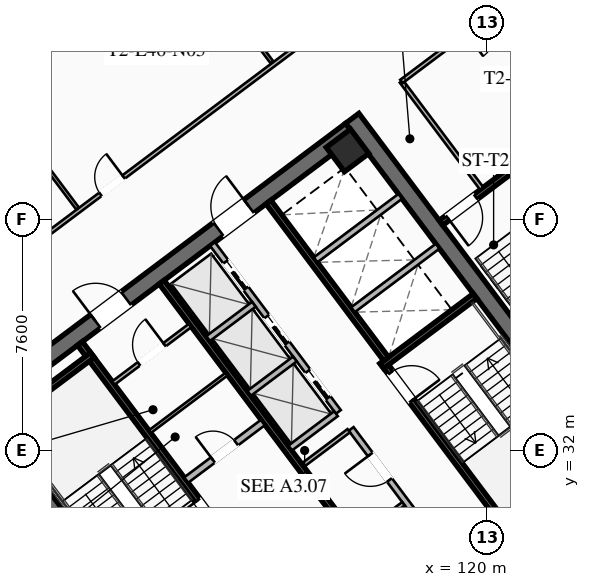
"""IFC4 building model, lengths in metres.
Left out: names, types, materials, properties, quantities, classifications, styles, units other than length and angle.
Written with IfcOpenShell. Run it as: python <this file> out.ifc"""

import sys

from ifc_helpers import new_model, si_unit, direction, frame, frame_2d, origin, origin_2d, place, context, subcontext, project, spatial, rectangle, hollow_rectangle, extrude, element, fill, save


model = new_model("IFC4")
c1 = context("Model", 3, precision=1e-05, world=origin(), true_north=direction((0.0, 1.0)))
c2 = subcontext(c1, "Body", "Model", "MODEL_VIEW")
j1 = project(units=[si_unit("LENGTHUNIT", "METRE"), si_unit("PLANEANGLEUNIT", "RADIAN")], contexts=[c1])
p1 = place(None, origin())
s1 = spatial("IfcSite", under=j1, at=p1, CompositionType="ELEMENT")
p2 = place(p1, origin())
s2 = spatial("IfcBuilding", under=s1, at=p2, CompositionType="ELEMENT")
p3 = place(p2, frame((0.0, 0.0, 171.2)))
s3 = spatial("IfcBuildingStorey", under=s2, at=p3, CompositionType="ELEMENT", Elevation=171.2)
for number, where, z_axis, x_axis in (
    (1, (112.436, 21.077, 0.0), (0.0, 0.0, 1.0), (-0.6, 0.8, 0.0)),
    (2, (115.564, 42.923, 0.0), (0.0, 0.0, 1.0), (0.6, -0.8, 0.0)),
):
    element("IfcWall", number, at=place(p3, frame(where, z_axis=z_axis, x_axis=x_axis)), inside=s3, PredefinedType="SHEAR", context=c2, shape_type="SweptSolid", body=[
        extrude(rectangle(XDim=15.6, YDim=0.55, at=frame_2d((7.8, 0.0))), origin(), (0.0, 0.0, 1.0), 3.55),
    ])
p4 = place(p3, frame((124.539, 30.498, 0.0), z_axis=(0.0, 0.0, 1.0), x_axis=(-0.799998054672, -0.600002593761, 0.0)))
e3 = element("IfcWall", 3, at=p4, inside=s3, PredefinedType="SHEAR", context=c2, shape_type="SweptSolid", body=[
    extrude(rectangle(XDim=15.06, YDim=0.55, at=frame_2d((7.53, 0.0))), origin(), (0.0, 0.0, 1.0), 3.55),
])
p5 = place(p4, frame((9.23, 0.0, 0.0)))
e4 = element("IfcOpeningElement", 4, at=p5, cuts=e3, PredefinedType="OPENING", context=c2, shape_type="SweptSolid", body=[
    extrude(rectangle(XDim=1.25, YDim=2.25, at=frame_2d((0.625, 1.125))), frame((0.0, 0.285, 0.0), z_axis=(0.0, -1.0, 0.0), x_axis=(1.0, 0.0, 0.0)), (0.0, 0.0, 1.0), 0.57),
])
p6 = place(p4, frame((4.18, 0.0, 0.0)))
e5 = element("IfcOpeningElement", 5, at=p6, cuts=e3, PredefinedType="OPENING", context=c2, shape_type="SweptSolid", body=[
    extrude(rectangle(XDim=1.25, YDim=2.25, at=frame_2d((0.625, 1.125))), frame((0.0, 0.285, 0.0), z_axis=(0.0, -1.0, 0.0), x_axis=(1.0, 0.0, 0.0)), (0.0, 0.0, 1.0), 0.57),
])
p7 = place(p3, frame((103.461, 33.502, 0.0), z_axis=(0.0, 0.0, 1.0), x_axis=(0.799998054672, 0.600002593761, 0.0)))
e6 = element("IfcWall", 6, at=p7, inside=s3, PredefinedType="SHEAR", context=c2, shape_type="SweptSolid", body=[
    extrude(rectangle(XDim=15.06, YDim=0.55, at=frame_2d((7.53, 0.0))), origin(), (0.0, 0.0, 1.0), 3.55),
])
p8 = place(p7, frame((4.58, 0.0, 0.0)))
e7 = element("IfcOpeningElement", 7, at=p8, cuts=e6, PredefinedType="OPENING", context=c2, shape_type="SweptSolid", body=[
    extrude(rectangle(XDim=1.25, YDim=2.25, at=frame_2d((0.625, 1.125))), frame((0.0, 0.285, 0.0), z_axis=(0.0, -1.0, 0.0), x_axis=(1.0, 0.0, 0.0)), (0.0, 0.0, 1.0), 0.57),
])
p9 = place(p7, frame((9.63, 0.0, 0.0)))
e8 = element("IfcOpeningElement", 8, at=p9, cuts=e6, PredefinedType="OPENING", context=c2, shape_type="SweptSolid", body=[
    extrude(rectangle(XDim=1.25, YDim=2.25, at=frame_2d((0.625, 1.125))), frame((0.0, 0.285, 0.0), z_axis=(0.0, -1.0, 0.0), x_axis=(1.0, 0.0, 0.0)), (0.0, 0.0, 1.0), 0.57),
])
p10 = place(p3, frame((115.41, 41.87, 0.0), z_axis=(0.0, 0.0, 1.0), x_axis=(0.799999996291, 0.600000004945, 0.0)))
e9 = element("IfcColumn", 9, at=p10, inside=s3, PredefinedType="COLUMN", context=c2, shape_type="SweptSolid", body=[
    extrude(hollow_rectangle(XDim=1.0, YDim=1.0, WallThickness=0.04, at=origin_2d()), origin(), (0.0, 0.0, 1.0), 3.37),
])
p11 = place(p3, frame((111.44, 29.08, 0.0), z_axis=(0.0, 0.0, 1.0), x_axis=(-0.59999029481, 0.8000072788, 0.0)))
e10 = element("IfcWall", 10, at=p11, inside=s3, PredefinedType="SHEAR", context=c2, shape_type="SweptSolid", body=[
    extrude(rectangle(XDim=8.05, YDim=0.2, at=frame_2d((4.025, 0.0))), origin(), (0.0, 0.0, 1.0), 3.37),
])
p12 = place(p11, frame((0.45, 0.0, 0.0)))
e11 = element("IfcOpeningElement", 11, at=p12, cuts=e10, PredefinedType="OPENING", context=c2, shape_type="SweptSolid", body=[
    extrude(rectangle(XDim=1.15, YDim=2.2, at=frame_2d((0.575, 1.1))), frame((0.0, 0.11, 0.0), z_axis=(0.0, -1.0, 0.0), x_axis=(1.0, 0.0, 0.0)), (0.0, 0.0, 1.0), 0.22),
])
p13 = place(p3, frame((103.956, 32.842, 0.0), z_axis=(0.0, 0.0, 1.0), x_axis=(0.800015298837, 0.599979601008, 0.0)))
e12 = element("IfcWall", 12, at=p13, inside=s3, PredefinedType="SHEAR", context=c2, shape_type="SweptSolid", body=[
    extrude(rectangle(XDim=3.83, YDim=0.2, at=frame_2d((1.915, 0.0))), origin(), (0.0, 0.0, 1.0), 3.37),
])
p14 = place(p3, frame((116.56, 34.92, 0.0), z_axis=(0.0, 0.0, 1.0), x_axis=(0.59999029481, -0.8000072788, 0.0)))
e13 = element("IfcWall", 13, at=p14, inside=s3, PredefinedType="SHEAR", context=c2, shape_type="SweptSolid", body=[
    extrude(rectangle(XDim=8.05, YDim=0.2, at=frame_2d((4.025, 0.0))), origin(), (0.0, 0.0, 1.0), 3.37),
])
p15 = place(p14, frame((0.45, 0.0, 0.0)))
e14 = element("IfcOpeningElement", 14, at=p15, cuts=e13, PredefinedType="OPENING", context=c2, shape_type="SweptSolid", body=[
    extrude(rectangle(XDim=1.15, YDim=2.2, at=frame_2d((0.575, 1.1))), frame((0.0, 0.11, 0.0), z_axis=(0.0, -1.0, 0.0), x_axis=(1.0, 0.0, 0.0)), (0.0, 0.0, 1.0), 0.22),
])
p16 = place(p3, frame((116.54, 34.78, 0.0), z_axis=(0.0, 0.0, 1.0), x_axis=(0.800015298837, 0.599979601008, 0.0)))
e15 = element("IfcWall", 15, at=p16, inside=s3, PredefinedType="SHEAR", context=c2, shape_type="SweptSolid", body=[
    extrude(rectangle(XDim=3.83, YDim=0.2, at=frame_2d((1.915, 0.0))), origin(), (0.0, 0.0, 1.0), 3.37),
])
p17 = place(p3, frame((117.998, 25.936, 0.0), z_axis=(0.0, 0.0, 1.0), x_axis=(-0.600002693989, 0.799997979501, 0.0)))
e16 = element("IfcWall", 16, at=p17, inside=s3, PredefinedType="SHEAR", context=c2, shape_type="SweptSolid", body=[
    extrude(rectangle(XDim=14.5, YDim=0.2, at=frame_2d((7.25, 0.0))), origin(), (0.0, 0.0, 1.0), 3.37),
])
p18 = place(p3, frame((110.104, 31.028, 0.0), z_axis=(0.0, 0.0, 1.0), x_axis=(0.800018601094, 0.59997519774, 0.0)))
e17 = element("IfcWall", 17, at=p18, inside=s3, PredefinedType="SOLIDWALL", context=c2, shape_type="SweptSolid", body=[
    extrude(rectangle(XDim=3.15, YDim=0.22, at=frame_2d((1.575, 0.0))), origin(), (0.0, 0.0, 1.0), 2.723),
])
p19 = place(p18, frame((1.1, 0.0, 0.0)))
e18 = element("IfcOpeningElement", 18, at=p19, cuts=e17, PredefinedType="OPENING", context=c2, shape_type="SweptSolid", body=[
    extrude(rectangle(XDim=0.95, YDim=2.05, at=frame_2d((0.475, 1.025))), frame((0.0, 0.12, 0.0), z_axis=(0.0, -1.0, 0.0), x_axis=(1.0, 0.0, 0.0)), (0.0, 0.0, 1.0), 0.24),
])
p20 = place(p3, frame((112.81, 40.17, 0.0), z_axis=(0.0, 0.0, 1.0), x_axis=(0.599993943644, -0.800004542231, 0.0)))
e19 = element("IfcWall", 19, at=p20, inside=s3, PredefinedType="SHEAR", context=c2, shape_type="SweptSolid", body=[
    extrude(rectangle(XDim=6.45, YDim=0.2, at=frame_2d((3.225, 0.0))), origin(), (0.0, 0.0, 1.0), 3.37),
])
for number, where, z_axis, x_axis in (
    (20, (115.59, 36.63, 0.0), (0.0, 0.0, 1.0), (0.8, 0.6, 0.0)),
    (21, (114.36, 38.27, 0.0), (0.0, 0.0, 1.0), (0.8, 0.6, 0.0)),
):
    element("IfcWall", number, at=place(p3, frame(where, z_axis=z_axis, x_axis=x_axis)), inside=s3, PredefinedType="SOLIDWALL", context=c2, shape_type="SweptSolid", body=[
        extrude(rectangle(XDim=3.48, YDim=0.2, at=frame_2d((1.74, 0.0))), origin(), (0.0, 0.0, 1.0), 3.37),
    ])
p21 = place(p3, frame((107.71, 34.22, 0.0), z_axis=(0.0, 0.0, 1.0), x_axis=(0.799981399002, 0.60002480053, 0.0)))
e22 = element("IfcWall", 22, at=p21, inside=s3, PredefinedType="PARTITIONING", context=c2, shape_type="SweptSolid", body=[
    extrude(rectangle(XDim=3.15, YDim=0.135, at=frame_2d((1.575, 0.0))), origin(), (0.0, 0.0, 1.0), 2.723),
])
p22 = place(p21, frame((1.05, 0.0, 0.0)))
e23 = element("IfcOpeningElement", 23, at=p22, cuts=e22, PredefinedType="OPENING", context=c2, shape_type="SweptSolid", body=[
    extrude(rectangle(XDim=1.05, YDim=2.2, at=frame_2d((0.525, 1.1))), frame((0.0, 0.077, 0.0), z_axis=(0.0, -1.0, 0.0), x_axis=(1.0, 0.0, 0.0)), (0.0, 0.0, 1.0), 0.155),
])
p23 = place(p3, frame((108.91, 32.62, 0.0), z_axis=(0.0, 0.0, 1.0), x_axis=(0.800018601094, 0.59997519774, 0.0)))
e24 = element("IfcWall", 24, at=p23, inside=s3, PredefinedType="PARTITIONING", context=c2, shape_type="SweptSolid", body=[
    extrude(rectangle(XDim=3.15, YDim=0.11, at=frame_2d((1.575, 0.0))), origin(), (0.0, 0.0, 1.0), 2.723),
])
p24 = place(p3, frame((119.67, 27.19, 0.0), z_axis=(0.0, 0.0, 1.0), x_axis=(-0.599988677396, 0.800008491828, 0.0)))
e25 = element("IfcWall", 25, at=p24, inside=s3, PredefinedType="SOLIDWALL", context=c2, shape_type="SweptSolid", body=[
    extrude(rectangle(XDim=6.9, YDim=0.2, at=frame_2d((3.45, 0.0))), origin(), (0.0, 0.0, 1.0), 2.723),
])
p25 = place(p24, frame((0.85, 0.0, 0.0)))
e26 = element("IfcOpeningElement", 26, at=p25, cuts=e25, PredefinedType="OPENING", context=c2, shape_type="SweptSolid", body=[
    extrude(rectangle(XDim=0.95, YDim=2.05, at=frame_2d((0.475, 1.025))), frame((0.0, 0.11, 0.0), z_axis=(0.0, -1.0, 0.0), x_axis=(1.0, 0.0, 0.0)), (0.0, 0.0, 1.0), 0.22),
])
p26 = place(p24, frame((4.8, 0.0, 0.0)))
e27 = element("IfcOpeningElement", 27, at=p26, cuts=e25, PredefinedType="OPENING", context=c2, shape_type="SweptSolid", body=[
    extrude(rectangle(XDim=1.05, YDim=2.2, at=frame_2d((0.525, 1.1))), frame((0.0, 0.11, 0.0), z_axis=(0.0, -1.0, 0.0), x_axis=(1.0, 0.0, 0.0)), (0.0, 0.0, 1.0), 0.22),
])
for number, where, z_axis, x_axis in (
    (28, (113.946, 31.522, 0.0), (0.0, 0.0, 1.0), (0.8, 0.6, 0.0)),
    (29, (115.746, 29.122, 0.0), (0.0, 0.0, 1.0), (0.8, 0.6, 0.0)),
):
    element("IfcWall", number, at=place(p3, frame(where, z_axis=z_axis, x_axis=x_axis)), inside=s3, PredefinedType="PARTITIONING", context=c2, shape_type="SweptSolid", body=[
        extrude(rectangle(XDim=1.88, YDim=0.135, at=frame_2d((0.94, 0.0))), origin(), (0.0, 0.0, 1.0), 2.723),
    ])
p27 = place(p3, frame((115.11, 33.27, 0.0), z_axis=(0.0, 0.0, 1.0), x_axis=(-0.600011322243, 0.799991508192, 0.0)))
e30 = element("IfcWall", 30, at=p27, inside=s3, PredefinedType="SOLIDWALL", context=c2, shape_type="SweptSolid", body=[
    extrude(rectangle(XDim=6.9, YDim=0.2, at=frame_2d((3.45, 0.0))), origin(), (0.0, 0.0, 1.0), 3.37),
])
p28 = place(p27, frame((0.575, 0.0, 0.0)))
e31 = element("IfcOpeningElement", 31, at=p28, cuts=e30, PredefinedType="OPENING", context=c2, shape_type="SweptSolid", body=[
    extrude(rectangle(XDim=1.1, YDim=2.2, at=frame_2d((0.55, 1.1))), frame((0.0, 0.11, 0.0), z_axis=(0.0, -1.0, 0.0), x_axis=(1.0, 0.0, 0.0)), (0.0, 0.0, 1.0), 0.22),
])
p29 = place(p27, frame((2.825, 0.0, 0.0)))
e32 = element("IfcOpeningElement", 32, at=p29, cuts=e30, PredefinedType="OPENING", context=c2, shape_type="SweptSolid", body=[
    extrude(rectangle(XDim=1.1, YDim=2.2, at=frame_2d((0.55, 1.1))), frame((0.0, 0.11, 0.0), z_axis=(0.0, -1.0, 0.0), x_axis=(1.0, 0.0, 0.0)), (0.0, 0.0, 1.0), 0.22),
])
p30 = place(p27, frame((5.075, 0.0, 0.0)))
e33 = element("IfcOpeningElement", 33, at=p30, cuts=e30, PredefinedType="OPENING", context=c2, shape_type="SweptSolid", body=[
    extrude(rectangle(XDim=1.1, YDim=2.2, at=frame_2d((0.55, 1.1))), frame((0.0, 0.11, 0.0), z_axis=(0.0, -1.0, 0.0), x_axis=(1.0, 0.0, 0.0)), (0.0, 0.0, 1.0), 0.22),
])
p31 = place(p3, frame((113.526, 32.082, 0.0), z_axis=(0.0, 0.0, 1.0), x_axis=(0.800046745961, 0.599937666993, 0.0)))
e34 = element("IfcWall", 34, at=p31, inside=s3, PredefinedType="SOLIDWALL", context=c2, shape_type="SweptSolid", body=[
    extrude(rectangle(XDim=1.88, YDim=0.2, at=frame_2d((0.94, 0.0))), origin(), (0.0, 0.0, 1.0), 3.37),
])
p32 = place(p3, frame((112.176, 33.882, 0.0), z_axis=(0.0, 0.0, 1.0), x_axis=(0.8, 0.6, 0.0)))
e35 = element("IfcWall", 35, at=p32, inside=s3, PredefinedType="SOLIDWALL", context=c2, shape_type="SweptSolid", body=[
    extrude(rectangle(XDim=1.88, YDim=0.2, at=frame_2d((0.94, 0.0))), origin(), (0.0, 0.0, 1.0), 3.37),
])
p33 = place(p3, frame((110.826, 35.682, 0.0), z_axis=(0.0, 0.0, 1.0), x_axis=(0.799984418148, 0.600020775241, 0.0)))
e36 = element("IfcWall", 36, at=p33, inside=s3, PredefinedType="SOLIDWALL", context=c2, shape_type="SweptSolid", body=[
    extrude(rectangle(XDim=1.88, YDim=0.2, at=frame_2d((0.94, 0.0))), origin(), (0.0, 0.0, 1.0), 3.37),
])
p34 = place(p3, frame((121.204, 41.528, 0.0), z_axis=(0.0, 0.0, 1.0), x_axis=(-0.800017232136, -0.599977023131, 0.0)))
e37 = element("IfcWall", 37, at=p34, inside=s3, PredefinedType="SHEAR", context=c2, shape_type="SweptSolid", body=[
    extrude(rectangle(XDim=3.4, YDim=0.2, at=frame_2d((1.7, 0.0))), origin(), (0.0, 0.0, 1.0), 3.37),
])
p35 = place(p34, frame((1.975, 0.0, 0.0)))
e38 = element("IfcOpeningElement", 38, at=p35, cuts=e37, PredefinedType="OPENING", context=c2, shape_type="SweptSolid", body=[
    extrude(rectangle(XDim=1.15, YDim=2.2, at=frame_2d((0.575, 1.1))), frame((0.0, 0.11, 0.0), z_axis=(0.0, -1.0, 0.0), x_axis=(1.0, 0.0, 0.0)), (0.0, 0.0, 1.0), 0.22),
])
p36 = place(p3, frame((119.824, 40.618, 0.0), z_axis=(0.0, 0.0, 1.0), x_axis=(-0.599982243973, 0.800013316712, 0.0)))
e39 = element("IfcWall", 39, at=p36, inside=s3, PredefinedType="PARTITIONING", context=c2, shape_type="SweptSolid", body=[
    extrude(rectangle(XDim=4.4, YDim=0.135, at=frame_2d((2.2, 0.0))), origin(), (0.0, 0.0, 1.0), 2.723),
])
p37 = place(p3, frame((96.058, 32.006, 0.0), z_axis=(0.0, 0.0, 1.0), x_axis=(0.8, 0.6, 0.0)))
e40 = element("IfcWall", 40, at=p37, inside=s3, PredefinedType="PARTITIONING", context=c2, shape_type="SweptSolid", body=[
    extrude(rectangle(XDim=28.7, YDim=0.135, at=frame_2d((14.35, 0.0))), origin(), (0.0, 0.0, 1.0), 2.723),
])
p38 = place(p37, frame((0.3, 0.0, 0.0)))
e41 = element("IfcOpeningElement", 41, at=p38, cuts=e40, PredefinedType="OPENING", context=c2, shape_type="SweptSolid", body=[
    extrude(rectangle(XDim=0.95, YDim=2.05, at=frame_2d((0.475, 1.025))), frame((0.0, 0.077, 0.0), z_axis=(0.0, -1.0, 0.0), x_axis=(1.0, 0.0, 0.0)), (0.0, 0.0, 1.0), 0.155),
])
p39 = place(p37, frame((10.01, 0.0, 0.0)))
e42 = element("IfcOpeningElement", 42, at=p39, cuts=e40, PredefinedType="OPENING", context=c2, shape_type="SweptSolid", body=[
    extrude(rectangle(XDim=0.95, YDim=2.05, at=frame_2d((0.475, 1.025))), frame((0.0, 0.077, 0.0), z_axis=(0.0, -1.0, 0.0), x_axis=(1.0, 0.0, 0.0)), (0.0, 0.0, 1.0), 0.155),
])
p40 = place(p37, frame((14.033, 0.0, 0.0)))
e43 = element("IfcOpeningElement", 43, at=p40, cuts=e40, PredefinedType="OPENING", context=c2, shape_type="SweptSolid", body=[
    extrude(rectangle(XDim=0.95, YDim=2.05, at=frame_2d((0.475, 1.025))), frame((0.0, 0.077, 0.0), z_axis=(0.0, -1.0, 0.0), x_axis=(1.0, 0.0, 0.0)), (0.0, 0.0, 1.0), 0.155),
])
p41 = place(p37, frame((27.45, 0.0, 0.0)))
e44 = element("IfcOpeningElement", 44, at=p41, cuts=e40, PredefinedType="OPENING", context=c2, shape_type="SweptSolid", body=[
    extrude(rectangle(XDim=0.95, YDim=2.05, at=frame_2d((0.475, 1.025))), frame((0.0, 0.077, 0.0), z_axis=(0.0, -1.0, 0.0), x_axis=(1.0, 0.0, 0.0)), (0.0, 0.0, 1.0), 0.155),
])
p42 = place(p3, frame((106.53, 39.96, 0.0), z_axis=(0.0, 0.0, 1.0), x_axis=(-0.6, 0.8, 0.0)))
e45 = element("IfcWall", 45, at=p42, inside=s3, PredefinedType="PARTITIONING", context=c2, shape_type="SweptSolid", body=[
    extrude(rectangle(XDim=5.93, YDim=0.11, at=frame_2d((2.965, 0.0))), origin(), (0.0, 0.0, 1.0), 2.723),
])
p43 = place(p3, frame((112.93, 44.76, 0.0), z_axis=(0.0, 0.0, 1.0), x_axis=(-0.599993412527, 0.800004940562, 0.0)))
e46 = element("IfcWall", 46, at=p43, inside=s3, PredefinedType="PARTITIONING", context=c2, shape_type="SweptSolid", body=[
    extrude(rectangle(XDim=5.93, YDim=0.11, at=frame_2d((2.965, 0.0))), origin(), (0.0, 0.0, 1.0), 2.723),
])
p44 = place(p3, frame((132.11, 31.77, 0.0), z_axis=(0.0, 0.0, 1.0), x_axis=(-0.800003062365, -0.599995916825, 0.0)))
e47 = element("IfcWall", 47, at=p44, inside=s3, PredefinedType="PARTITIONING", context=c2, shape_type="SweptSolid", body=[
    extrude(rectangle(XDim=28.7, YDim=0.135, at=frame_2d((14.35, 0.0))), origin(), (0.0, 0.0, 1.0), 2.723),
])
p45 = place(p44, frame((27.37, 0.0, 0.0)))
e48 = element("IfcOpeningElement", 48, at=p45, cuts=e47, PredefinedType="OPENING", context=c2, shape_type="SweptSolid", body=[
    extrude(rectangle(XDim=0.95, YDim=2.05, at=frame_2d((0.475, 1.025))), frame((0.0, 0.077, 0.0), z_axis=(0.0, -1.0, 0.0), x_axis=(1.0, 0.0, 0.0)), (0.0, 0.0, 1.0), 0.155),
])
p46 = place(p44, frame((17.698, 0.0, 0.0)))
e49 = element("IfcOpeningElement", 49, at=p46, cuts=e47, PredefinedType="OPENING", context=c2, shape_type="SweptSolid", body=[
    extrude(rectangle(XDim=0.95, YDim=2.05, at=frame_2d((0.475, 1.025))), frame((0.0, 0.077, 0.0), z_axis=(0.0, -1.0, 0.0), x_axis=(1.0, 0.0, 0.0)), (0.0, 0.0, 1.0), 0.155),
])
p47 = place(p44, frame((13.639, 0.0, 0.0)))
e50 = element("IfcOpeningElement", 50, at=p47, cuts=e47, PredefinedType="OPENING", context=c2, shape_type="SweptSolid", body=[
    extrude(rectangle(XDim=0.95, YDim=2.05, at=frame_2d((0.475, 1.025))), frame((0.0, 0.077, 0.0), z_axis=(0.0, -1.0, 0.0), x_axis=(1.0, 0.0, 0.0)), (0.0, 0.0, 1.0), 0.155),
])
p48 = place(p44, frame((0.38, 0.0, 0.0)))
e51 = element("IfcOpeningElement", 51, at=p48, cuts=e47, PredefinedType="OPENING", context=c2, shape_type="SweptSolid", body=[
    extrude(rectangle(XDim=0.95, YDim=2.05, at=frame_2d((0.475, 1.025))), frame((0.0, 0.077, 0.0), z_axis=(0.0, -1.0, 0.0), x_axis=(1.0, 0.0, 0.0)), (0.0, 0.0, 1.0), 0.155),
])
p49 = place(p3, frame((122.744, 48.308, 0.0), z_axis=(0.0, 0.0, 1.0), x_axis=(-0.79997892247, -0.600028102345, 0.0)))
e52 = element("IfcWall", 52, at=p49, inside=s3, PredefinedType="PARTITIONING", context=c2, shape_type="SweptSolid", body=[
    extrude(rectangle(XDim=6.95, YDim=0.135, at=frame_2d((3.475, 0.0))), origin(), (0.0, 0.0, 1.0), 2.723),
])
p50 = place(p49, frame((3.35, 0.0, 0.0)))
e53 = element("IfcOpeningElement", 53, at=p50, cuts=e52, PredefinedType="OPENING", context=c2, shape_type="SweptSolid", body=[
    extrude(rectangle(XDim=0.95, YDim=2.05, at=frame_2d((0.475, 1.025))), frame((0.0, 0.077, 0.0), z_axis=(0.0, -1.0, 0.0), x_axis=(1.0, 0.0, 0.0)), (0.0, 0.0, 1.0), 0.155),
])
p51 = place(p3, frame((112.104, 20.928, 0.0), z_axis=(0.0, 0.0, 1.0), x_axis=(-0.599994940075, 0.800003794918, 0.0)))
e54 = element("IfcWall", 54, at=p51, inside=s3, PredefinedType="PARTITIONING", context=c2, shape_type="SweptSolid", body=[
    extrude(rectangle(XDim=15.44, YDim=0.135, at=frame_2d((7.72, 0.0))), origin(), (0.0, 0.0, 1.0), 2.723),
])
p52 = place(p8, origin())
e55 = element("IfcDoor", 55, at=p52, inside=s3, OperationType="SINGLE_SWING_LEFT", PredefinedType="DOOR", context=c2, shape_type="SweptSolid", body=[
    extrude(rectangle(XDim=1.25, YDim=2.25, at=frame_2d((0.625, 1.125))), frame((0.0, 0.025, 0.0), z_axis=(0.0, -1.0, 0.0), x_axis=(1.0, 0.0, 0.0)), (0.0, 0.0, 1.0), 0.05),
])
fill(e7, e55)
p53 = place(p9, origin())
e56 = element("IfcDoor", 56, at=p53, inside=s3, OperationType="SINGLE_SWING_RIGHT", PredefinedType="DOOR", context=c2, shape_type="SweptSolid", body=[
    extrude(rectangle(XDim=1.25, YDim=2.25, at=frame_2d((0.625, 1.125))), frame((0.0, 0.025, 0.0), z_axis=(0.0, -1.0, 0.0), x_axis=(1.0, 0.0, 0.0)), (0.0, 0.0, 1.0), 0.05),
])
fill(e8, e56)
p54 = place(p12, origin())
e57 = element("IfcDoor", 57, at=p54, inside=s3, OperationType="SINGLE_SWING_RIGHT", PredefinedType="DOOR", context=c2, shape_type="SweptSolid", body=[
    extrude(rectangle(XDim=1.15, YDim=2.2, at=frame_2d((0.575, 1.1))), frame((0.0, 0.025, 0.0), z_axis=(0.0, -1.0, 0.0), x_axis=(1.0, 0.0, 0.0)), (0.0, 0.0, 1.0), 0.05),
])
fill(e11, e57)
p55 = place(p15, origin())
e58 = element("IfcDoor", 58, at=p55, inside=s3, OperationType="SINGLE_SWING_RIGHT", PredefinedType="DOOR", context=c2, shape_type="SweptSolid", body=[
    extrude(rectangle(XDim=1.15, YDim=2.2, at=frame_2d((0.575, 1.1))), frame((0.0, 0.025, 0.0), z_axis=(0.0, -1.0, 0.0), x_axis=(1.0, 0.0, 0.0)), (0.0, 0.0, 1.0), 0.05),
])
fill(e14, e58)
p56 = place(p22, origin())
e59 = element("IfcDoor", 59, at=p56, inside=s3, OperationType="SINGLE_SWING_RIGHT", PredefinedType="DOOR", context=c2, shape_type="SweptSolid", body=[
    extrude(rectangle(XDim=1.05, YDim=2.2, at=frame_2d((0.525, 1.1))), frame((0.0, 0.025, 0.0), z_axis=(0.0, -1.0, 0.0), x_axis=(1.0, 0.0, 0.0)), (0.0, 0.0, 1.0), 0.05),
])
fill(e23, e59)
p57 = place(p19, origin())
e60 = element("IfcDoor", 60, at=p57, inside=s3, OperationType="SINGLE_SWING_LEFT", PredefinedType="DOOR", context=c2, shape_type="SweptSolid", body=[
    extrude(rectangle(XDim=0.95, YDim=2.05, at=frame_2d((0.475, 1.025))), frame((0.0, 0.025, 0.0), z_axis=(0.0, -1.0, 0.0), x_axis=(1.0, 0.0, 0.0)), (0.0, 0.0, 1.0), 0.05),
])
fill(e18, e60)
p58 = place(p26, origin())
e61 = element("IfcDoor", 61, at=p58, inside=s3, OperationType="SINGLE_SWING_RIGHT", PredefinedType="DOOR", context=c2, shape_type="SweptSolid", body=[
    extrude(rectangle(XDim=1.05, YDim=2.2, at=frame_2d((0.525, 1.1))), frame((0.0, 0.025, 0.0), z_axis=(0.0, -1.0, 0.0), x_axis=(1.0, 0.0, 0.0)), (0.0, 0.0, 1.0), 0.05),
])
fill(e27, e61)
p59 = place(p35, origin())
e62 = element("IfcDoor", 62, at=p59, inside=s3, OperationType="SINGLE_SWING_RIGHT", PredefinedType="DOOR", context=c2, shape_type="SweptSolid", body=[
    extrude(rectangle(XDim=1.15, YDim=2.2, at=frame_2d((0.575, 1.1))), frame((0.0, 0.025, 0.0), z_axis=(0.0, -1.0, 0.0), x_axis=(1.0, 0.0, 0.0)), (0.0, 0.0, 1.0), 0.05),
])
fill(e38, e62)
p60 = place(p40, origin())
e63 = element("IfcDoor", 63, at=p60, inside=s3, OperationType="SINGLE_SWING_RIGHT", PredefinedType="DOOR", context=c2, shape_type="SweptSolid", body=[
    extrude(rectangle(XDim=0.95, YDim=2.05, at=frame_2d((0.475, 1.025))), frame((0.0, 0.025, 0.0), z_axis=(0.0, -1.0, 0.0), x_axis=(1.0, 0.0, 0.0)), (0.0, 0.0, 1.0), 0.05),
])
fill(e43, e63)
p61 = place(p28, origin())
e64 = element("IfcDoor", 64, at=p61, inside=s3, OperationType="SLIDING_TO_LEFT", PredefinedType="DOOR", context=c2, shape_type="SweptSolid", body=[
    extrude(rectangle(XDim=1.1, YDim=2.2, at=frame_2d((0.55, 1.1))), frame((0.0, 0.025, 0.0), z_axis=(0.0, -1.0, 0.0), x_axis=(1.0, 0.0, 0.0)), (0.0, 0.0, 1.0), 0.05),
])
fill(e31, e64)
p62 = place(p29, origin())
e65 = element("IfcDoor", 65, at=p62, inside=s3, OperationType="SLIDING_TO_LEFT", PredefinedType="DOOR", context=c2, shape_type="SweptSolid", body=[
    extrude(rectangle(XDim=1.1, YDim=2.2, at=frame_2d((0.55, 1.1))), frame((0.0, 0.025, 0.0), z_axis=(0.0, -1.0, 0.0), x_axis=(1.0, 0.0, 0.0)), (0.0, 0.0, 1.0), 0.05),
])
fill(e32, e65)
p63 = place(p30, origin())
e66 = element("IfcDoor", 66, at=p63, inside=s3, OperationType="SLIDING_TO_LEFT", PredefinedType="DOOR", context=c2, shape_type="SweptSolid", body=[
    extrude(rectangle(XDim=1.1, YDim=2.2, at=frame_2d((0.55, 1.1))), frame((0.0, 0.025, 0.0), z_axis=(0.0, -1.0, 0.0), x_axis=(1.0, 0.0, 0.0)), (0.0, 0.0, 1.0), 0.05),
])
fill(e33, e66)
save(model, sys.argv[1])
